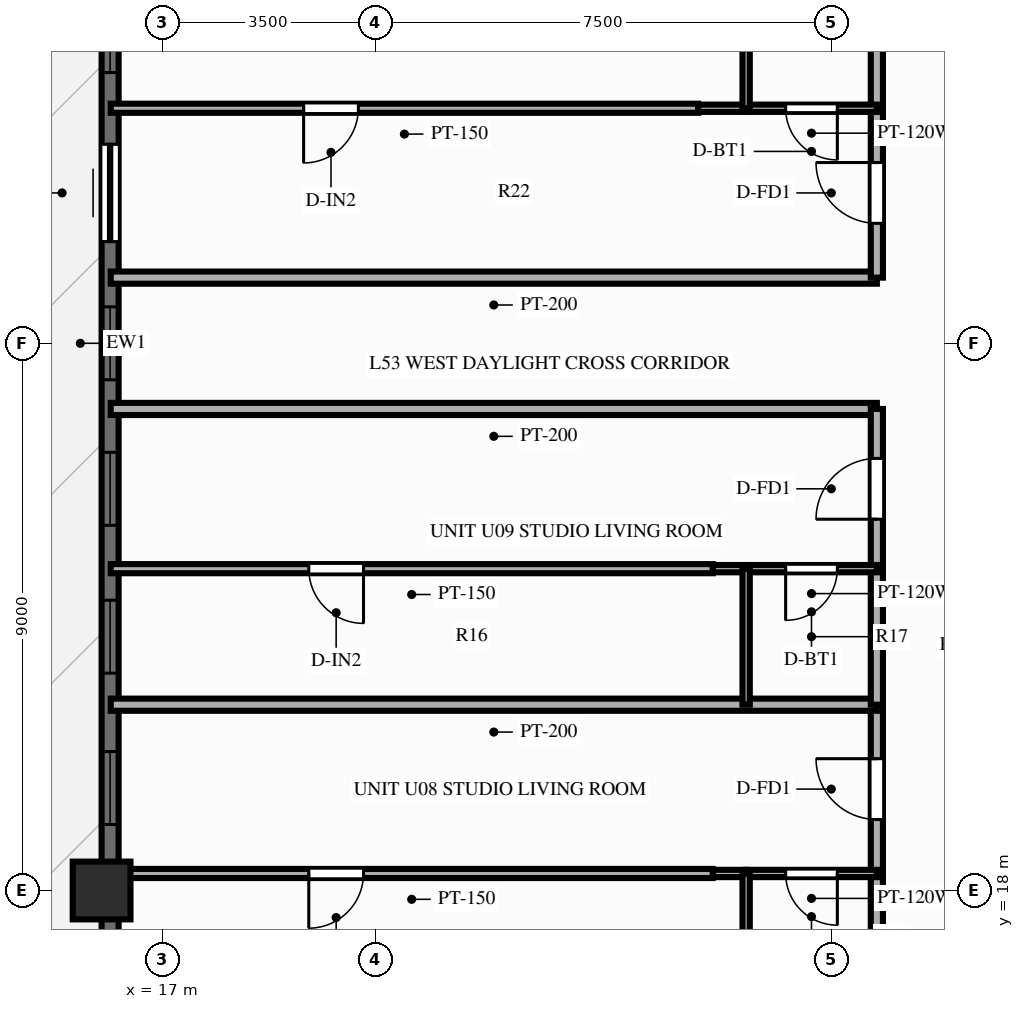
"""IFC4 building model, lengths in metres.
Left out: names, types, materials, properties, quantities, classifications, styles, units other than length and angle.
Written with IfcOpenShell. Run it as: python <this file> out.ifc"""

import sys

from ifc_helpers import new_model, si_unit, direction, frame, frame_2d, origin, origin_2d, place, context, subcontext, project, spatial, rectangle, extrude, source, transform, mapped, element, fill, save


model = new_model("IFC4")
c1 = context("Model", 3, precision=1e-05, world=origin(), true_north=direction((0.0, 1.0)))
c2 = subcontext(c1, "Body", "Model", "MODEL_VIEW")
j1 = project(units=[si_unit("LENGTHUNIT", "METRE"), si_unit("PLANEANGLEUNIT", "RADIAN")], contexts=[c1])
p1 = place(None, origin())
s1 = spatial("IfcSite", under=j1, at=p1, CompositionType="ELEMENT")
p2 = place(p1, origin())
s2 = spatial("IfcBuilding", under=s1, at=p2, CompositionType="ELEMENT")
p3 = place(p2, frame((0.0, 0.0, 169.0)))
s3 = spatial("IfcBuildingStorey", under=s2, at=p3, CompositionType="ELEMENT", Elevation=169.0)
m1 = source(origin(), c2, "Body", "SweptSolid", [
    extrude(rectangle(XDim=0.95, YDim=0.95, at=origin_2d()), origin(), (0.0, 0.0, 1.0), 3.9),
])
p4 = place(p3, frame((16.0, 18.0, 0.0), z_axis=(0.0, 0.0, 1.0), x_axis=(1.0, 0.0, 0.0)))
e1 = element("IfcColumn", 1, at=p4, inside=s3, PredefinedType="COLUMN", context=c2, shape_type="MappedRepresentation", body=[
    mapped(m1, transform((0.0, 0.0, 0.0), scale=1.0)),
])
p5 = place(p3, frame((16.14, 11.0, 0.0), z_axis=(0.0, 0.0, 1.0), x_axis=(0.0, 1.0, 0.0)))
e2 = element("IfcWall", 2, at=p5, inside=s3, PredefinedType="SOLIDWALL", context=c2, shape_type="SweptSolid", body=[
    extrude(rectangle(XDim=32.0, YDim=0.28, at=frame_2d((16.0, 0.0))), origin(), (0.0, 0.0, 1.0), 2.44),
])
p6 = place(p5, frame((0.8, 0.0, 0.25)))
e3 = element("IfcOpeningElement", 3, at=p6, cuts=e2, PredefinedType="OPENING", context=c2, shape_type="SweptSolid", body=[
    extrude(rectangle(XDim=1.2, YDim=1.5, at=frame_2d((0.6, 0.75))), frame((0.0, 0.152, 0.0), z_axis=(0.0, -1.0, 0.0), x_axis=(1.0, 0.0, 0.0)), (0.0, 0.0, 1.0), 0.304),
])
p7 = place(p5, frame((3.239, 0.0, 0.25)))
e4 = element("IfcOpeningElement", 4, at=p7, cuts=e2, PredefinedType="OPENING", context=c2, shape_type="SweptSolid", body=[
    extrude(rectangle(XDim=1.2, YDim=1.5, at=frame_2d((0.6, 0.75))), frame((0.0, 0.152, 0.0), z_axis=(0.0, -1.0, 0.0), x_axis=(1.0, 0.0, 0.0)), (0.0, 0.0, 1.0), 0.304),
])
p8 = place(p5, frame((5.588, 0.0, 0.25)))
e5 = element("IfcOpeningElement", 5, at=p8, cuts=e2, PredefinedType="OPENING", context=c2, shape_type="SweptSolid", body=[
    extrude(rectangle(XDim=0.7, YDim=1.5, at=frame_2d((0.35, 0.75))), frame((0.0, 0.152, 0.0), z_axis=(0.0, -1.0, 0.0), x_axis=(1.0, 0.0, 0.0)), (0.0, 0.0, 1.0), 0.304),
])
p9 = place(p5, frame((8.085, 0.0, 0.25)))
e6 = element("IfcOpeningElement", 6, at=p9, cuts=e2, PredefinedType="OPENING", context=c2, shape_type="SweptSolid", body=[
    extrude(rectangle(XDim=1.2, YDim=1.5, at=frame_2d((0.6, 0.75))), frame((0.0, 0.152, 0.0), z_axis=(0.0, -1.0, 0.0), x_axis=(1.0, 0.0, 0.0)), (0.0, 0.0, 1.0), 0.304),
])
p10 = place(p5, frame((10.575, 0.0, 0.25)))
e7 = element("IfcOpeningElement", 7, at=p10, cuts=e2, PredefinedType="OPENING", context=c2, shape_type="SweptSolid", body=[
    extrude(rectangle(XDim=1.2, YDim=1.5, at=frame_2d((0.6, 0.75))), frame((0.0, 0.152, 0.0), z_axis=(0.0, -1.0, 0.0), x_axis=(1.0, 0.0, 0.0)), (0.0, 0.0, 1.0), 0.304),
])
p11 = place(p5, frame((13.007, 0.0, 0.25)))
e8 = element("IfcOpeningElement", 8, at=p11, cuts=e2, PredefinedType="OPENING", context=c2, shape_type="SweptSolid", body=[
    extrude(rectangle(XDim=1.2, YDim=1.5, at=frame_2d((0.6, 0.75))), frame((0.0, 0.152, 0.0), z_axis=(0.0, -1.0, 0.0), x_axis=(1.0, 0.0, 0.0)), (0.0, 0.0, 1.0), 0.304),
])
p12 = place(p5, frame((15.4, 0.0, 0.25)))
e9 = element("IfcOpeningElement", 9, at=p12, cuts=e2, PredefinedType="OPENING", context=c2, shape_type="SweptSolid", body=[
    extrude(rectangle(XDim=1.2, YDim=1.5, at=frame_2d((0.6, 0.75))), frame((0.0, 0.152, 0.0), z_axis=(0.0, -1.0, 0.0), x_axis=(1.0, 0.0, 0.0)), (0.0, 0.0, 1.0), 0.304),
])
p13 = place(p5, frame((17.673, 0.0, 0.0)))
e10 = element("IfcOpeningElement", 10, at=p13, cuts=e2, PredefinedType="OPENING", context=c2, shape_type="SweptSolid", body=[
    extrude(rectangle(XDim=1.6, YDim=2.15, at=frame_2d((0.8, 1.075))), frame((0.0, 0.152, 0.0), z_axis=(0.0, -1.0, 0.0), x_axis=(1.0, 0.0, 0.0)), (0.0, 0.0, 1.0), 0.304),
])
p14 = place(p5, frame((20.452, 0.0, 0.25)))
e11 = element("IfcOpeningElement", 11, at=p14, cuts=e2, PredefinedType="OPENING", context=c2, shape_type="SweptSolid", body=[
    extrude(rectangle(XDim=1.2, YDim=1.5, at=frame_2d((0.6, 0.75))), frame((0.0, 0.152, 0.0), z_axis=(0.0, -1.0, 0.0), x_axis=(1.0, 0.0, 0.0)), (0.0, 0.0, 1.0), 0.304),
])
p15 = place(p5, frame((22.862, 0.0, 0.25)))
e12 = element("IfcOpeningElement", 12, at=p15, cuts=e2, PredefinedType="OPENING", context=c2, shape_type="SweptSolid", body=[
    extrude(rectangle(XDim=1.2, YDim=1.5, at=frame_2d((0.6, 0.75))), frame((0.0, 0.152, 0.0), z_axis=(0.0, -1.0, 0.0), x_axis=(1.0, 0.0, 0.0)), (0.0, 0.0, 1.0), 0.304),
])
p16 = place(p5, frame((25.734, 0.0, 0.25)))
e13 = element("IfcOpeningElement", 13, at=p16, cuts=e2, PredefinedType="OPENING", context=c2, shape_type="SweptSolid", body=[
    extrude(rectangle(XDim=0.95, YDim=1.5, at=frame_2d((0.475, 0.75))), frame((0.0, 0.152, 0.0), z_axis=(0.0, -1.0, 0.0), x_axis=(1.0, 0.0, 0.0)), (0.0, 0.0, 1.0), 0.304),
])
p17 = place(p5, frame((27.777, 0.0, 0.25)))
e14 = element("IfcOpeningElement", 14, at=p17, cuts=e2, PredefinedType="OPENING", context=c2, shape_type="SweptSolid", body=[
    extrude(rectangle(XDim=1.2, YDim=1.5, at=frame_2d((0.6, 0.75))), frame((0.0, 0.152, 0.0), z_axis=(0.0, -1.0, 0.0), x_axis=(1.0, 0.0, 0.0)), (0.0, 0.0, 1.0), 0.304),
])
p18 = place(p5, frame((30.068, 0.0, 0.25)))
e15 = element("IfcOpeningElement", 15, at=p18, cuts=e2, PredefinedType="OPENING", context=c2, shape_type="SweptSolid", body=[
    extrude(rectangle(XDim=1.2, YDim=1.5, at=frame_2d((0.6, 0.75))), frame((0.0, 0.152, 0.0), z_axis=(0.0, -1.0, 0.0), x_axis=(1.0, 0.0, 0.0)), (0.0, 0.0, 1.0), 0.304),
])
p19 = place(p3, frame((28.75, 25.92, 0.0), z_axis=(0.0, 0.0, 1.0), x_axis=(-1.0, 0.0, 0.0)))
e16 = element("IfcWall", 16, at=p19, inside=s3, PredefinedType="PARTITIONING", context=c2, shape_type="SweptSolid", body=[
    extrude(rectangle(XDim=12.6, YDim=0.2, at=frame_2d((6.3, 0.0))), origin(), (0.0, 0.0, 1.0), 3.56),
])
p20 = place(p3, frame((28.75, 16.192, 0.0), z_axis=(0.0, 0.0, 1.0), x_axis=(0.0, 1.0, 0.0)))
e17 = element("IfcWall", 17, at=p20, inside=s3, PredefinedType="PARTITIONING", context=c2, shape_type="SweptSolid", body=[
    extrude(rectangle(XDim=2.088, YDim=0.2, at=frame_2d((1.044, 0.0))), origin(), (0.0, 0.0, 1.0), 3.56),
])
p21 = place(p3, frame((28.75, 18.28, 0.0), z_axis=(0.0, 0.0, 1.0), x_axis=(0.0, 1.0, 0.0)))
e18 = element("IfcWall", 18, at=p21, inside=s3, PredefinedType="PARTITIONING", context=c2, shape_type="SweptSolid", body=[
    extrude(rectangle(XDim=2.776, YDim=0.2, at=frame_2d((1.388, 0.0))), origin(), (0.0, 0.0, 1.0), 3.56),
])
p22 = place(p21, frame((0.888, 0.0, 0.0)))
e19 = element("IfcOpeningElement", 19, at=p22, cuts=e18, PredefinedType="OPENING", context=c2, shape_type="SweptSolid", body=[
    extrude(rectangle(XDim=1.0, YDim=2.15, at=frame_2d((0.5, 1.075))), frame((0.0, 0.112, 0.0), z_axis=(0.0, -1.0, 0.0), x_axis=(1.0, 0.0, 0.0)), (0.0, 0.0, 1.0), 0.224),
])
p23 = place(p3, frame((28.75, 18.28, 0.0), z_axis=(0.0, 0.0, 1.0), x_axis=(-1.0, 0.0, 0.0)))
e20 = element("IfcWall", 20, at=p23, inside=s3, PredefinedType="PARTITIONING", context=c2, shape_type="SweptSolid", body=[
    extrude(rectangle(XDim=2.15, YDim=0.12, at=frame_2d((1.075, 0.0))), origin(), (0.0, 0.0, 1.0), 3.56),
])
p24 = place(p23, frame((0.65, 0.0, 0.0)))
e21 = element("IfcOpeningElement", 21, at=p24, cuts=e20, PredefinedType="OPENING", context=c2, shape_type="SweptSolid", body=[
    extrude(rectangle(XDim=0.85, YDim=2.05, at=frame_2d((0.425, 1.025))), frame((0.0, 0.072, 0.0), z_axis=(0.0, -1.0, 0.0), x_axis=(1.0, 0.0, 0.0)), (0.0, 0.0, 1.0), 0.144),
])
p25 = place(p3, frame((26.6, 18.28, 0.0), z_axis=(0.0, 0.0, 1.0), x_axis=(-1.0, 0.0, 0.0)))
e22 = element("IfcWall", 22, at=p25, inside=s3, PredefinedType="PARTITIONING", context=c2, shape_type="SweptSolid", body=[
    extrude(rectangle(XDim=0.55, YDim=0.12, at=frame_2d((0.275, 0.0))), origin(), (0.0, 0.0, 1.0), 3.56),
])
p26 = place(p3, frame((26.6, 16.192, 0.0), z_axis=(0.0, 0.0, 1.0), x_axis=(0.0, 1.0, 0.0)))
e23 = element("IfcWall", 23, at=p26, inside=s3, PredefinedType="PARTITIONING", context=c2, shape_type="SweptSolid", body=[
    extrude(rectangle(XDim=2.088, YDim=0.12, at=frame_2d((1.044, 0.0))), origin(), (0.0, 0.0, 1.0), 3.56),
])
p27 = place(p3, frame((26.05, 18.28, 0.0), z_axis=(0.0, 0.0, 1.0), x_axis=(-1.0, 0.0, 0.0)))
e24 = element("IfcWall", 24, at=p27, inside=s3, PredefinedType="PARTITIONING", context=c2, shape_type="SweptSolid", body=[
    extrude(rectangle(XDim=9.9, YDim=0.15, at=frame_2d((4.95, 0.0))), origin(), (0.0, 0.0, 1.0), 3.56),
])
p28 = place(p27, frame((5.742, 0.0, 0.0)))
e25 = element("IfcOpeningElement", 25, at=p28, cuts=e24, PredefinedType="OPENING", context=c2, shape_type="SweptSolid", body=[
    extrude(rectangle(XDim=0.9, YDim=2.1, at=frame_2d((0.45, 1.05))), frame((0.0, 0.087, 0.0), z_axis=(0.0, -1.0, 0.0), x_axis=(1.0, 0.0, 0.0)), (0.0, 0.0, 1.0), 0.174),
])
p29 = place(p3, frame((28.75, 21.056, 0.0), z_axis=(0.0, 0.0, 1.0), x_axis=(-1.0, 0.0, 0.0)))
e26 = element("IfcWall", 26, at=p29, inside=s3, PredefinedType="PARTITIONING", context=c2, shape_type="SweptSolid", body=[
    extrude(rectangle(XDim=12.6, YDim=0.2, at=frame_2d((6.3, 0.0))), origin(), (0.0, 0.0, 1.0), 3.56),
])
p30 = place(p3, frame((28.75, 21.056, 0.0), z_axis=(0.0, 0.0, 1.0), x_axis=(0.0, 1.0, 0.0)))
e27 = element("IfcWall", 27, at=p30, inside=s3, PredefinedType="PARTITIONING", context=c2, shape_type="SweptSolid", body=[
    extrude(rectangle(XDim=2.237, YDim=0.2, at=frame_2d((1.119, 0.0))), origin(), (0.0, 0.0, 1.0), 3.56),
])
p31 = place(p3, frame((28.75, 23.293, 0.0), z_axis=(0.0, 0.0, 1.0), x_axis=(0.0, 1.0, 0.0)))
e28 = element("IfcWall", 28, at=p31, inside=s3, PredefinedType="PARTITIONING", context=c2, shape_type="SweptSolid", body=[
    extrude(rectangle(XDim=2.627, YDim=0.2, at=frame_2d((1.313, 0.0))), origin(), (0.0, 0.0, 1.0), 3.56),
])
p32 = place(p31, frame((0.813, 0.0, 0.0)))
e29 = element("IfcOpeningElement", 29, at=p32, cuts=e28, PredefinedType="OPENING", context=c2, shape_type="SweptSolid", body=[
    extrude(rectangle(XDim=1.0, YDim=2.15, at=frame_2d((0.5, 1.075))), frame((0.0, 0.112, 0.0), z_axis=(0.0, -1.0, 0.0), x_axis=(1.0, 0.0, 0.0)), (0.0, 0.0, 1.0), 0.224),
])
p33 = place(p3, frame((28.75, 23.293, 0.0), z_axis=(0.0, 0.0, 1.0), x_axis=(-1.0, 0.0, 0.0)))
e30 = element("IfcWall", 30, at=p33, inside=s3, PredefinedType="PARTITIONING", context=c2, shape_type="SweptSolid", body=[
    extrude(rectangle(XDim=2.15, YDim=0.12, at=frame_2d((1.075, 0.0))), origin(), (0.0, 0.0, 1.0), 3.56),
])
p34 = place(p33, frame((0.65, 0.0, 0.0)))
e31 = element("IfcOpeningElement", 31, at=p34, cuts=e30, PredefinedType="OPENING", context=c2, shape_type="SweptSolid", body=[
    extrude(rectangle(XDim=0.85, YDim=2.05, at=frame_2d((0.425, 1.025))), frame((0.0, 0.072, 0.0), z_axis=(0.0, -1.0, 0.0), x_axis=(1.0, 0.0, 0.0)), (0.0, 0.0, 1.0), 0.144),
])
p35 = place(p3, frame((26.6, 23.293, 0.0), z_axis=(0.0, 0.0, 1.0), x_axis=(-1.0, 0.0, 0.0)))
e32 = element("IfcWall", 32, at=p35, inside=s3, PredefinedType="PARTITIONING", context=c2, shape_type="SweptSolid", body=[
    extrude(rectangle(XDim=0.55, YDim=0.12, at=frame_2d((0.275, 0.0))), origin(), (0.0, 0.0, 1.0), 3.56),
])
p36 = place(p3, frame((26.6, 21.056, 0.0), z_axis=(0.0, 0.0, 1.0), x_axis=(0.0, 1.0, 0.0)))
e33 = element("IfcWall", 33, at=p36, inside=s3, PredefinedType="PARTITIONING", context=c2, shape_type="SweptSolid", body=[
    extrude(rectangle(XDim=2.237, YDim=0.12, at=frame_2d((1.119, 0.0))), origin(), (0.0, 0.0, 1.0), 3.56),
])
p37 = place(p3, frame((26.05, 23.293, 0.0), z_axis=(0.0, 0.0, 1.0), x_axis=(-1.0, 0.0, 0.0)))
e34 = element("IfcWall", 34, at=p37, inside=s3, PredefinedType="PARTITIONING", context=c2, shape_type="SweptSolid", body=[
    extrude(rectangle(XDim=9.9, YDim=0.15, at=frame_2d((4.95, 0.0))), origin(), (0.0, 0.0, 1.0), 3.56),
])
p38 = place(p37, frame((5.742, 0.0, 0.0)))
e35 = element("IfcOpeningElement", 35, at=p38, cuts=e34, PredefinedType="OPENING", context=c2, shape_type="SweptSolid", body=[
    extrude(rectangle(XDim=0.9, YDim=2.1, at=frame_2d((0.45, 1.05))), frame((0.0, 0.087, 0.0), z_axis=(0.0, -1.0, 0.0), x_axis=(1.0, 0.0, 0.0)), (0.0, 0.0, 1.0), 0.174),
])
p39 = place(p3, frame((28.75, 28.08, 0.0), z_axis=(0.0, 0.0, 1.0), x_axis=(-1.0, 0.0, 0.0)))
e36 = element("IfcWall", 36, at=p39, inside=s3, PredefinedType="PARTITIONING", context=c2, shape_type="SweptSolid", body=[
    extrude(rectangle(XDim=12.6, YDim=0.2, at=frame_2d((6.3, 0.0))), origin(), (0.0, 0.0, 1.0), 3.56),
])
p40 = place(p3, frame((28.75, 28.08, 0.0), z_axis=(0.0, 0.0, 1.0), x_axis=(0.0, 1.0, 0.0)))
e37 = element("IfcWall", 37, at=p40, inside=s3, PredefinedType="PARTITIONING", context=c2, shape_type="SweptSolid", body=[
    extrude(rectangle(XDim=2.786, YDim=0.2, at=frame_2d((1.393, 0.0))), origin(), (0.0, 0.0, 1.0), 3.56),
])
p41 = place(p40, frame((0.893, 0.0, 0.0)))
e38 = element("IfcOpeningElement", 38, at=p41, cuts=e37, PredefinedType="OPENING", context=c2, shape_type="SweptSolid", body=[
    extrude(rectangle(XDim=1.0, YDim=2.15, at=frame_2d((0.5, 1.075))), frame((0.0, 0.112, 0.0), z_axis=(0.0, -1.0, 0.0), x_axis=(1.0, 0.0, 0.0)), (0.0, 0.0, 1.0), 0.224),
])
p42 = place(p3, frame((28.75, 30.866, 0.0), z_axis=(0.0, 0.0, 1.0), x_axis=(0.0, 1.0, 0.0)))
e39 = element("IfcWall", 39, at=p42, inside=s3, PredefinedType="PARTITIONING", context=c2, shape_type="SweptSolid", body=[
    extrude(rectangle(XDim=2.373, YDim=0.2, at=frame_2d((1.187, 0.0))), origin(), (0.0, 0.0, 1.0), 3.56),
])
p43 = place(p3, frame((28.75, 30.866, 0.0), z_axis=(0.0, 0.0, 1.0), x_axis=(-1.0, 0.0, 0.0)))
e40 = element("IfcWall", 40, at=p43, inside=s3, PredefinedType="PARTITIONING", context=c2, shape_type="SweptSolid", body=[
    extrude(rectangle(XDim=2.15, YDim=0.12, at=frame_2d((1.075, 0.0))), origin(), (0.0, 0.0, 1.0), 3.56),
])
p44 = place(p43, frame((0.65, 0.0, 0.0)))
e41 = element("IfcOpeningElement", 41, at=p44, cuts=e40, PredefinedType="OPENING", context=c2, shape_type="SweptSolid", body=[
    extrude(rectangle(XDim=0.85, YDim=2.05, at=frame_2d((0.425, 1.025))), frame((0.0, 0.072, 0.0), z_axis=(0.0, -1.0, 0.0), x_axis=(1.0, 0.0, 0.0)), (0.0, 0.0, 1.0), 0.144),
])
p45 = place(p3, frame((26.6, 30.866, 0.0), z_axis=(0.0, 0.0, 1.0), x_axis=(-1.0, 0.0, 0.0)))
e42 = element("IfcWall", 42, at=p45, inside=s3, PredefinedType="PARTITIONING", context=c2, shape_type="SweptSolid", body=[
    extrude(rectangle(XDim=0.79, YDim=0.12, at=frame_2d((0.395, 0.0))), origin(), (0.0, 0.0, 1.0), 3.56),
])
p46 = place(p3, frame((26.6, 30.866, 0.0), z_axis=(0.0, 0.0, 1.0), x_axis=(0.0, 1.0, 0.0)))
e43 = element("IfcWall", 43, at=p46, inside=s3, PredefinedType="PARTITIONING", context=c2, shape_type="SweptSolid", body=[
    extrude(rectangle(XDim=2.373, YDim=0.12, at=frame_2d((1.187, 0.0))), origin(), (0.0, 0.0, 1.0), 3.56),
])
p47 = place(p3, frame((25.81, 30.866, 0.0), z_axis=(0.0, 0.0, 1.0), x_axis=(-1.0, 0.0, 0.0)))
e44 = element("IfcWall", 44, at=p47, inside=s3, PredefinedType="PARTITIONING", context=c2, shape_type="SweptSolid", body=[
    extrude(rectangle(XDim=9.66, YDim=0.15, at=frame_2d((4.83, 0.0))), origin(), (0.0, 0.0, 1.0), 3.56),
])
p48 = place(p47, frame((5.587, 0.0, 0.0)))
e45 = element("IfcOpeningElement", 45, at=p48, cuts=e44, PredefinedType="OPENING", context=c2, shape_type="SweptSolid", body=[
    extrude(rectangle(XDim=0.9, YDim=2.1, at=frame_2d((0.45, 1.05))), frame((0.0, 0.087, 0.0), z_axis=(0.0, -1.0, 0.0), x_axis=(1.0, 0.0, 0.0)), (0.0, 0.0, 1.0), 0.174),
])
m2 = source(origin(), c2, "Body", "SweptSolid", [
    extrude(rectangle(XDim=1.2, YDim=1.5, at=frame_2d((0.6, 0.75))), frame((0.0, 0.03, 0.0), z_axis=(0.0, -1.0, 0.0), x_axis=(1.0, 0.0, 0.0)), (0.0, 0.0, 1.0), 0.06),
])
p49 = place(p9, origin())
e46 = element("IfcWindow", 46, at=p49, inside=s3, PartitioningType="SINGLE_PANEL", PredefinedType="WINDOW", context=c2, shape_type="MappedRepresentation", body=[
    mapped(m2, transform((0.0, 0.0, 0.0), scale=1.0)),
])
fill(e6, e46)
p50 = place(p10, origin())
e47 = element("IfcWindow", 47, at=p50, inside=s3, PartitioningType="SINGLE_PANEL", PredefinedType="WINDOW", context=c2, shape_type="MappedRepresentation", body=[
    mapped(m2, transform((0.0, 0.0, 0.0), scale=1.0)),
])
fill(e7, e47)
p51 = place(p11, origin())
e48 = element("IfcWindow", 48, at=p51, inside=s3, PartitioningType="SINGLE_PANEL", PredefinedType="WINDOW", context=c2, shape_type="MappedRepresentation", body=[
    mapped(m2, transform((0.0, 0.0, 0.0), scale=1.0)),
])
fill(e8, e48)
p52 = place(p12, origin())
e49 = element("IfcWindow", 49, at=p52, inside=s3, PartitioningType="SINGLE_PANEL", PredefinedType="WINDOW", context=c2, shape_type="MappedRepresentation", body=[
    mapped(m2, transform((0.0, 0.0, 0.0), scale=1.0)),
])
fill(e9, e49)
m3 = source(origin(), c2, "Body", "SweptSolid", [
    extrude(rectangle(XDim=1.6, YDim=2.15, at=frame_2d((0.8, 1.075))), frame((0.0, 0.025, 0.0), z_axis=(0.0, -1.0, 0.0), x_axis=(1.0, 0.0, 0.0)), (0.0, 0.0, 1.0), 0.05),
])
p53 = place(p13, origin())
e50 = element("IfcDoor", 50, at=p53, inside=s3, OperationType="SLIDING_TO_LEFT", PredefinedType="DOOR", context=c2, shape_type="MappedRepresentation", body=[
    mapped(m3, transform((0.0, 0.0, 0.0), scale=1.0)),
])
fill(e10, e50)
p54 = place(p14, origin())
e51 = element("IfcWindow", 51, at=p54, inside=s3, PartitioningType="SINGLE_PANEL", PredefinedType="WINDOW", context=c2, shape_type="MappedRepresentation", body=[
    mapped(m2, transform((0.0, 0.0, 0.0), scale=1.0)),
])
fill(e11, e51)
m4 = source(origin(), c2, "Body", "SweptSolid", [
    extrude(rectangle(XDim=1.0, YDim=2.15, at=frame_2d((0.5, 1.075))), frame((0.0, 0.025, 0.0), z_axis=(0.0, -1.0, 0.0), x_axis=(1.0, 0.0, 0.0)), (0.0, 0.0, 1.0), 0.05),
])
p55 = place(p22, origin())
e52 = element("IfcDoor", 52, at=p55, inside=s3, OperationType="SINGLE_SWING_RIGHT", PredefinedType="DOOR", context=c2, shape_type="MappedRepresentation", body=[
    mapped(m4, transform((0.0, 0.0, 0.0), scale=1.0)),
])
fill(e19, e52)
m5 = source(origin(), c2, "Body", "SweptSolid", [
    extrude(rectangle(XDim=0.85, YDim=2.05, at=frame_2d((0.425, 1.025))), frame((0.0, 0.025, 0.0), z_axis=(0.0, -1.0, 0.0), x_axis=(1.0, 0.0, 0.0)), (0.0, 0.0, 1.0), 0.05),
])
p56 = place(p24, origin())
e53 = element("IfcDoor", 53, at=p56, inside=s3, OperationType="SINGLE_SWING_LEFT", PredefinedType="DOOR", context=c2, shape_type="MappedRepresentation", body=[
    mapped(m5, transform((0.0, 0.0, 0.0), scale=1.0)),
])
fill(e21, e53)
m6 = source(origin(), c2, "Body", "SweptSolid", [
    extrude(rectangle(XDim=0.9, YDim=2.1, at=frame_2d((0.45, 1.05))), frame((0.0, 0.025, 0.0), z_axis=(0.0, -1.0, 0.0), x_axis=(1.0, 0.0, 0.0)), (0.0, 0.0, 1.0), 0.05),
])
p57 = place(p28, origin())
e54 = element("IfcDoor", 54, at=p57, inside=s3, OperationType="SINGLE_SWING_RIGHT", PredefinedType="DOOR", context=c2, shape_type="MappedRepresentation", body=[
    mapped(m6, transform((0.0, 0.0, 0.0), scale=1.0)),
])
fill(e25, e54)
p58 = place(p32, origin())
e55 = element("IfcDoor", 55, at=p58, inside=s3, OperationType="SINGLE_SWING_LEFT", PredefinedType="DOOR", context=c2, shape_type="MappedRepresentation", body=[
    mapped(m4, transform((0.0, 0.0, 0.0), scale=1.0)),
])
fill(e29, e55)
p59 = place(p34, origin())
e56 = element("IfcDoor", 56, at=p59, inside=s3, OperationType="SINGLE_SWING_RIGHT", PredefinedType="DOOR", context=c2, shape_type="MappedRepresentation", body=[
    mapped(m5, transform((0.0, 0.0, 0.0), scale=1.0)),
])
fill(e31, e56)
p60 = place(p38, origin())
e57 = element("IfcDoor", 57, at=p60, inside=s3, OperationType="SINGLE_SWING_LEFT", PredefinedType="DOOR", context=c2, shape_type="MappedRepresentation", body=[
    mapped(m6, transform((0.0, 0.0, 0.0), scale=1.0)),
])
fill(e35, e57)
p61 = place(p41, origin())
e58 = element("IfcDoor", 58, at=p61, inside=s3, OperationType="SINGLE_SWING_RIGHT", PredefinedType="DOOR", context=c2, shape_type="MappedRepresentation", body=[
    mapped(m4, transform((0.0, 0.0, 0.0), scale=1.0)),
])
fill(e38, e58)
p62 = place(p44, origin())
e59 = element("IfcDoor", 59, at=p62, inside=s3, OperationType="SINGLE_SWING_LEFT", PredefinedType="DOOR", context=c2, shape_type="MappedRepresentation", body=[
    mapped(m5, transform((0.0, 0.0, 0.0), scale=1.0)),
])
fill(e41, e59)
p63 = place(p48, origin())
e60 = element("IfcDoor", 60, at=p63, inside=s3, OperationType="SINGLE_SWING_RIGHT", PredefinedType="DOOR", context=c2, shape_type="MappedRepresentation", body=[
    mapped(m6, transform((0.0, 0.0, 0.0), scale=1.0)),
])
fill(e45, e60)
save(model, sys.argv[1])
